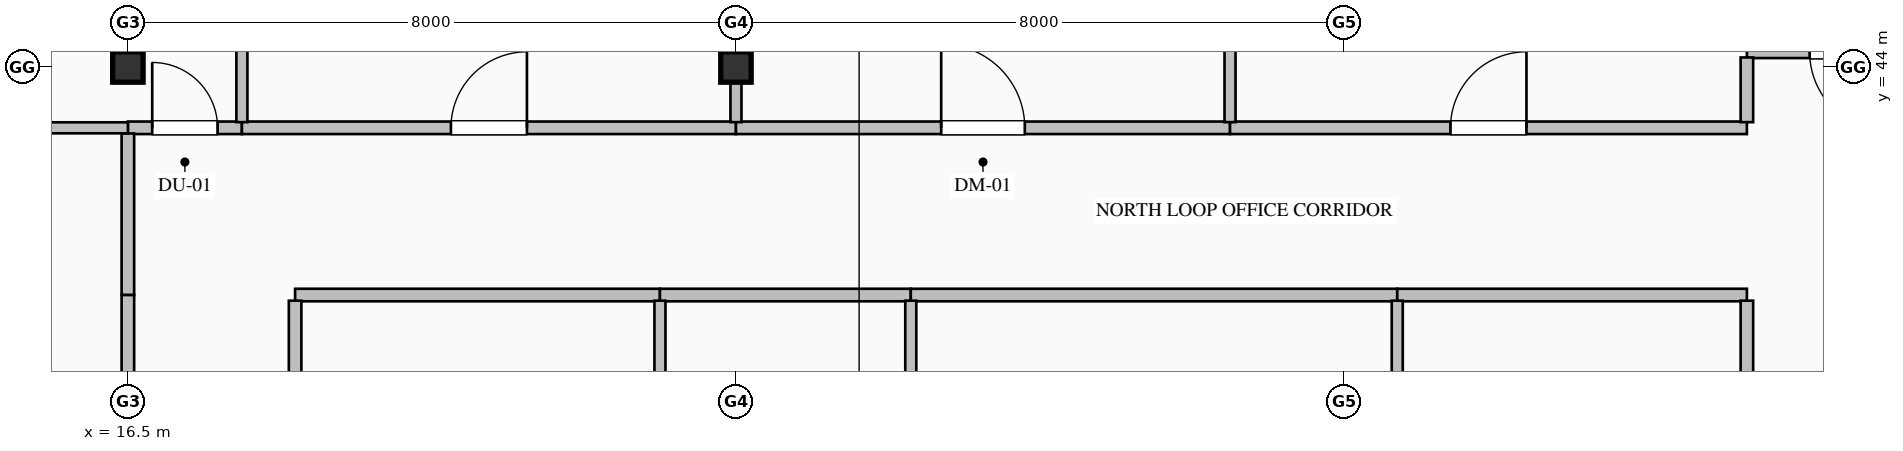
"""IFC4 building model, lengths in metres.
Left out: names, types, materials, properties, quantities, classifications, styles, units other than length and angle.
Written with IfcOpenShell. Run it as: python <this file> out.ifc"""

import sys

from ifc_helpers import new_model, si_unit, direction, frame, frame_2d, origin, origin_2d, place, context, subcontext, project, spatial, rectangle, i_section, extrude, element, fill, save


model = new_model("IFC4")
c1 = context("Model", 3, precision=1e-05, world=origin(), true_north=direction((0.0, 1.0)))
c2 = subcontext(c1, "Body", "Model", "MODEL_VIEW")
j1 = project(units=[si_unit("LENGTHUNIT", "METRE"), si_unit("PLANEANGLEUNIT", "RADIAN")], contexts=[c1])
p1 = place(None, origin())
s1 = spatial("IfcSite", under=j1, at=p1, CompositionType="ELEMENT")
p2 = place(p1, origin())
s2 = spatial("IfcBuilding", under=s1, at=p2, CompositionType="ELEMENT")
p3 = place(p2, frame((0.0, 0.0, 183.0)))
s3 = spatial("IfcBuildingStorey", under=s2, at=p3, CompositionType="ELEMENT", Elevation=183.0)
for number, where, z_axis, x_axis in (
    (1, (16.5, 44.0, 0.0), (0.0, 0.0, 1.0), (1.0, 0.0, 0.0)),
    (2, (24.5, 44.0, 0.0), (0.0, 0.0, 1.0), (1.0, 0.0, 0.0)),
):
    element("IfcColumn", number, at=place(p3, frame(where, z_axis=z_axis, x_axis=x_axis)), inside=s3, PredefinedType="COLUMN", context=c2, shape_type="SweptSolid", body=[
        extrude(i_section(OverallWidth=0.4, OverallDepth=0.4, WebThickness=0.013, FlangeThickness=0.021, FilletRadius=0.022, at=origin_2d()), origin(), (0.0, 0.0, 1.0), 4.0),
    ])
p4 = place(p3, frame((40.5, 44.2, 0.0), z_axis=(0.0, 0.0, 1.0), x_axis=(-1.0, 0.0, 0.0)))
e3 = element("IfcWall", 3, at=p4, inside=s3, PredefinedType="PARTITIONING", context=c2, shape_type="SweptSolid", body=[
    extrude(rectangle(XDim=2.7, YDim=0.165, at=frame_2d((1.35, 0.0))), origin(), (0.0, 0.0, 1.0), 3.765),
])
p5 = place(p4, frame((0.825, 0.0, 0.0)))
e4 = element("IfcOpeningElement", 4, at=p5, cuts=e3, PredefinedType="OPENING", context=c2, shape_type="SweptSolid", body=[
    extrude(rectangle(XDim=1.05, YDim=2.15, at=frame_2d((0.525, 1.075))), frame((0.0, 0.093, 0.0), z_axis=(0.0, -1.0, 0.0), x_axis=(1.0, 0.0, 0.0)), (0.0, 0.0, 1.0), 0.185),
])
p6 = place(p3, frame((16.5, 43.2, 0.0), z_axis=(0.0, 0.0, 1.0), x_axis=(1.0, 0.0, 0.0)))
e5 = element("IfcWall", 5, at=p6, inside=s3, PredefinedType="PARTITIONING", context=c2, shape_type="SweptSolid", body=[
    extrude(rectangle(XDim=1.5, YDim=0.165, at=frame_2d((0.75, 0.0))), origin(), (0.0, 0.0, 1.0), 3.765),
])
p7 = place(p6, frame((0.32, 0.0, 0.0)))
e6 = element("IfcOpeningElement", 6, at=p7, cuts=e5, PredefinedType="OPENING", context=c2, shape_type="SweptSolid", body=[
    extrude(rectangle(XDim=0.86, YDim=2.1, at=frame_2d((0.43, 1.05))), frame((0.0, 0.093, 0.0), z_axis=(0.0, -1.0, 0.0), x_axis=(1.0, 0.0, 0.0)), (0.0, 0.0, 1.0), 0.185),
])
p8 = place(p3, frame((18.0, 43.2, 0.0), z_axis=(0.0, 0.0, 1.0), x_axis=(1.0, 0.0, 0.0)))
e7 = element("IfcWall", 7, at=p8, inside=s3, PredefinedType="PARTITIONING", context=c2, shape_type="SweptSolid", body=[
    extrude(rectangle(XDim=6.5, YDim=0.165, at=frame_2d((3.25, 0.0))), origin(), (0.0, 0.0, 1.0), 3.765),
])
p9 = place(p8, frame((2.75, 0.0, 0.0)))
e8 = element("IfcOpeningElement", 8, at=p9, cuts=e7, PredefinedType="OPENING", context=c2, shape_type="SweptSolid", body=[
    extrude(rectangle(XDim=1.0, YDim=2.15, at=frame_2d((0.5, 1.075))), frame((0.0, 0.093, 0.0), z_axis=(0.0, -1.0, 0.0), x_axis=(1.0, 0.0, 0.0)), (0.0, 0.0, 1.0), 0.185),
])
p10 = place(p3, frame((24.5, 43.2, 0.0), z_axis=(0.0, 0.0, 1.0), x_axis=(1.0, 0.0, 0.0)))
e9 = element("IfcWall", 9, at=p10, inside=s3, PredefinedType="PARTITIONING", context=c2, shape_type="SweptSolid", body=[
    extrude(rectangle(XDim=6.5, YDim=0.165, at=frame_2d((3.25, 0.0))), origin(), (0.0, 0.0, 1.0), 3.765),
])
p11 = place(p10, frame((2.7, 0.0, 0.0)))
e10 = element("IfcOpeningElement", 10, at=p11, cuts=e9, PredefinedType="OPENING", context=c2, shape_type="SweptSolid", body=[
    extrude(rectangle(XDim=1.1, YDim=2.2, at=frame_2d((0.55, 1.1))), frame((0.0, 0.093, 0.0), z_axis=(0.0, -1.0, 0.0), x_axis=(1.0, 0.0, 0.0)), (0.0, 0.0, 1.0), 0.185),
])
p12 = place(p3, frame((31.0, 43.2, 0.0), z_axis=(0.0, 0.0, 1.0), x_axis=(1.0, 0.0, 0.0)))
e11 = element("IfcWall", 11, at=p12, inside=s3, PredefinedType="PARTITIONING", context=c2, shape_type="SweptSolid", body=[
    extrude(rectangle(XDim=6.8, YDim=0.165, at=frame_2d((3.4, 0.0))), origin(), (0.0, 0.0, 1.0), 3.765),
])
p13 = place(p12, frame((2.9, 0.0, 0.0)))
e12 = element("IfcOpeningElement", 12, at=p13, cuts=e11, PredefinedType="OPENING", context=c2, shape_type="SweptSolid", body=[
    extrude(rectangle(XDim=1.0, YDim=2.15, at=frame_2d((0.5, 1.075))), frame((0.0, 0.093, 0.0), z_axis=(0.0, -1.0, 0.0), x_axis=(1.0, 0.0, 0.0)), (0.0, 0.0, 1.0), 0.185),
])
p14 = place(p3, frame((23.5, 41.0, 0.0), z_axis=(0.0, 0.0, 1.0), x_axis=(-1.0, 0.0, 0.0)))
e13 = element("IfcWall", 13, at=p14, inside=s3, PredefinedType="PARTITIONING", context=c2, shape_type="SweptSolid", body=[
    extrude(rectangle(XDim=4.8, YDim=0.165, at=frame_2d((2.4, 0.0))), origin(), (0.0, 0.0, 1.0), 3.765),
])
p15 = place(p3, frame((26.8, 41.0, 0.0), z_axis=(0.0, 0.0, 1.0), x_axis=(-1.0, 0.0, 0.0)))
e14 = element("IfcWall", 14, at=p15, inside=s3, PredefinedType="PARTITIONING", context=c2, shape_type="SweptSolid", body=[
    extrude(rectangle(XDim=3.3, YDim=0.165, at=frame_2d((1.65, 0.0))), origin(), (0.0, 0.0, 1.0), 3.765),
])
p16 = place(p3, frame((33.2, 41.0, 0.0), z_axis=(0.0, 0.0, 1.0), x_axis=(-1.0, 0.0, 0.0)))
e15 = element("IfcWall", 15, at=p16, inside=s3, PredefinedType="PARTITIONING", context=c2, shape_type="SweptSolid", body=[
    extrude(rectangle(XDim=6.4, YDim=0.165, at=frame_2d((3.2, 0.0))), origin(), (0.0, 0.0, 1.0), 3.765),
])
p17 = place(p3, frame((37.8, 41.0, 0.0), z_axis=(0.0, 0.0, 1.0), x_axis=(-1.0, 0.0, 0.0)))
e16 = element("IfcWall", 16, at=p17, inside=s3, PredefinedType="PARTITIONING", context=c2, shape_type="SweptSolid", body=[
    extrude(rectangle(XDim=4.6, YDim=0.165, at=frame_2d((2.3, 0.0))), origin(), (0.0, 0.0, 1.0), 3.765),
])
p18 = place(p3, frame((16.5, 41.0, 0.0), z_axis=(0.0, 0.0, 1.0), x_axis=(0.0, 1.0, 0.0)))
e17 = element("IfcWall", 17, at=p18, inside=s3, PredefinedType="PARTITIONING", context=c2, shape_type="SweptSolid", body=[
    extrude(rectangle(XDim=2.125, YDim=0.165, at=frame_2d((1.063, 0.0))), origin(), (0.0, 0.0, 1.0), 3.157),
])
p19 = place(p3, frame((18.7, 40.926, 0.0), z_axis=(0.0, 0.0, 1.0), x_axis=(0.0, -1.0, 0.0)))
e18 = element("IfcWall", 18, at=p19, inside=s3, PredefinedType="PARTITIONING", context=c2, shape_type="SweptSolid", body=[
    extrude(rectangle(XDim=7.451, YDim=0.165, at=frame_2d((3.726, 0.0))), origin(), (0.0, 0.0, 1.0), 3.765),
])
p20 = place(p19, frame((3.226, 0.0, 0.0)))
e19 = element("IfcOpeningElement", 19, at=p20, cuts=e18, PredefinedType="OPENING", context=c2, shape_type="SweptSolid", body=[
    extrude(rectangle(XDim=1.0, YDim=2.15, at=frame_2d((0.5, 1.075))), frame((0.0, 0.093, 0.0), z_axis=(0.0, -1.0, 0.0), x_axis=(1.0, 0.0, 0.0)), (0.0, 0.0, 1.0), 0.185),
])
p21 = place(p3, frame((16.5, 33.4, 0.0), z_axis=(0.0, 0.0, 1.0), x_axis=(0.0, 1.0, 0.0)))
e20 = element("IfcWall", 20, at=p21, inside=s3, PredefinedType="PARTITIONING", context=c2, shape_type="SweptSolid", body=[
    extrude(rectangle(XDim=7.6, YDim=0.165, at=frame_2d((3.8, 0.0))), origin(), (0.0, 0.0, 1.0), 3.157),
])
p22 = place(p21, frame((3.3, 0.0, 0.0)))
e21 = element("IfcOpeningElement", 21, at=p22, cuts=e20, PredefinedType="OPENING", context=c2, shape_type="SweptSolid", body=[
    extrude(rectangle(XDim=1.0, YDim=2.15, at=frame_2d((0.5, 1.075))), frame((0.0, 0.093, 0.0), z_axis=(0.0, -1.0, 0.0), x_axis=(1.0, 0.0, 0.0)), (0.0, 0.0, 1.0), 0.185),
])
p23 = place(p3, frame((37.8, 43.274, 0.0), z_axis=(0.0, 0.0, 1.0), x_axis=(0.0, 1.0, 0.0)))
e22 = element("IfcWall", 22, at=p23, inside=s3, PredefinedType="PARTITIONING", context=c2, shape_type="SweptSolid", body=[
    extrude(rectangle(XDim=0.851, YDim=0.165, at=frame_2d((0.426, 0.0))), origin(), (0.0, 0.0, 1.0), 3.765),
])
p24 = place(p3, frame((37.8, 33.475, 0.0), z_axis=(0.0, 0.0, 1.0), x_axis=(0.0, 1.0, 0.0)))
e23 = element("IfcWall", 23, at=p24, inside=s3, PredefinedType="PARTITIONING", context=c2, shape_type="SweptSolid", body=[
    extrude(rectangle(XDim=7.451, YDim=0.165, at=frame_2d((3.726, 0.0))), origin(), (0.0, 0.0, 1.0), 3.765),
])
p25 = place(p24, frame((3.226, 0.0, 0.0)))
e24 = element("IfcOpeningElement", 24, at=p25, cuts=e23, PredefinedType="OPENING", context=c2, shape_type="SweptSolid", body=[
    extrude(rectangle(XDim=1.0, YDim=2.15, at=frame_2d((0.5, 1.075))), frame((0.0, 0.093, 0.0), z_axis=(0.0, -1.0, 0.0), x_axis=(1.0, 0.0, 0.0)), (0.0, 0.0, 1.0), 0.185),
])
p26 = place(p3, frame((18.0, 51.648, 0.0), z_axis=(0.0, 0.0, 1.0), x_axis=(0.0, -1.0, 0.0)))
e25 = element("IfcWall", 25, at=p26, inside=s3, PredefinedType="PARTITIONING", context=c2, shape_type="SweptSolid", body=[
    extrude(rectangle(XDim=8.374, YDim=0.145, at=frame_2d((4.187, 0.0))), origin(), (0.0, 0.0, 1.0), 3.765),
])
p27 = place(p3, frame((16.5, 43.2, 0.0), z_axis=(0.0, 0.0, 1.0), x_axis=(-1.0, 0.0, 0.0)))
e26 = element("IfcWall", 26, at=p27, inside=s3, PredefinedType="PARTITIONING", context=c2, shape_type="SweptSolid", body=[
    extrude(rectangle(XDim=5.0, YDim=0.145, at=frame_2d((2.5, 0.0))), origin(), (0.0, 0.0, 1.0), 3.765),
])
p28 = place(p3, frame((24.5, 51.648, 0.0), z_axis=(0.0, 0.0, 1.0), x_axis=(0.0, -1.0, 0.0)))
e27 = element("IfcWall", 27, at=p28, inside=s3, PredefinedType="PARTITIONING", context=c2, shape_type="SweptSolid", body=[
    extrude(rectangle(XDim=8.374, YDim=0.145, at=frame_2d((4.187, 0.0))), origin(), (0.0, 0.0, 1.0), 3.157),
])
p29 = place(p3, frame((31.0, 51.648, 0.0), z_axis=(0.0, 0.0, 1.0), x_axis=(0.0, -1.0, 0.0)))
e28 = element("IfcWall", 28, at=p29, inside=s3, PredefinedType="PARTITIONING", context=c2, shape_type="SweptSolid", body=[
    extrude(rectangle(XDim=8.374, YDim=0.145, at=frame_2d((4.187, 0.0))), origin(), (0.0, 0.0, 1.0), 3.765),
])
for number, where, z_axis, x_axis in (
    (29, (23.5, 40.926, 0.0), (0.0, 0.0, 1.0), (0.0, -1.0, 0.0)),
    (30, (26.8, 40.926, 0.0), (0.0, 0.0, 1.0), (0.0, -1.0, 0.0)),
    (31, (33.2, 40.926, 0.0), (0.0, 0.0, 1.0), (0.0, -1.0, 0.0)),
):
    element("IfcWall", number, at=place(p3, frame(where, z_axis=z_axis, x_axis=x_axis)), inside=s3, PredefinedType="PARTITIONING", context=c2, shape_type="SweptSolid", body=[
        extrude(rectangle(XDim=7.451, YDim=0.145, at=frame_2d((3.726, 0.0))), origin(), (0.0, 0.0, 1.0), 3.765),
    ])
p30 = place(p5, origin())
e32 = element("IfcDoor", 32, at=p30, inside=s3, OperationType="SINGLE_SWING_LEFT", PredefinedType="DOOR", context=c2, shape_type="SweptSolid", body=[
    extrude(rectangle(XDim=1.05, YDim=2.15, at=frame_2d((0.525, 1.075))), frame((0.0, 0.025, 0.0), z_axis=(0.0, -1.0, 0.0), x_axis=(1.0, 0.0, 0.0)), (0.0, 0.0, 1.0), 0.05),
])
fill(e4, e32)
p31 = place(p7, origin())
e33 = element("IfcDoor", 33, at=p31, inside=s3, OperationType="SINGLE_SWING_LEFT", PredefinedType="DOOR", context=c2, shape_type="SweptSolid", body=[
    extrude(rectangle(XDim=0.86, YDim=2.1, at=frame_2d((0.43, 1.05))), frame((0.0, 0.025, 0.0), z_axis=(0.0, -1.0, 0.0), x_axis=(1.0, 0.0, 0.0)), (0.0, 0.0, 1.0), 0.05),
])
fill(e6, e33)
p32 = place(p9, origin())
e34 = element("IfcDoor", 34, at=p32, inside=s3, OperationType="SINGLE_SWING_RIGHT", PredefinedType="DOOR", context=c2, shape_type="SweptSolid", body=[
    extrude(rectangle(XDim=1.0, YDim=2.15, at=frame_2d((0.5, 1.075))), frame((0.0, 0.025, 0.0), z_axis=(0.0, -1.0, 0.0), x_axis=(1.0, 0.0, 0.0)), (0.0, 0.0, 1.0), 0.05),
])
fill(e8, e34)
p33 = place(p11, origin())
e35 = element("IfcDoor", 35, at=p33, inside=s3, OperationType="SINGLE_SWING_LEFT", PredefinedType="DOOR", context=c2, shape_type="SweptSolid", body=[
    extrude(rectangle(XDim=1.1, YDim=2.2, at=frame_2d((0.55, 1.1))), frame((0.0, 0.025, 0.0), z_axis=(0.0, -1.0, 0.0), x_axis=(1.0, 0.0, 0.0)), (0.0, 0.0, 1.0), 0.05),
])
fill(e10, e35)
p34 = place(p13, origin())
e36 = element("IfcDoor", 36, at=p34, inside=s3, OperationType="SINGLE_SWING_RIGHT", PredefinedType="DOOR", context=c2, shape_type="SweptSolid", body=[
    extrude(rectangle(XDim=1.0, YDim=2.15, at=frame_2d((0.5, 1.075))), frame((0.0, 0.025, 0.0), z_axis=(0.0, -1.0, 0.0), x_axis=(1.0, 0.0, 0.0)), (0.0, 0.0, 1.0), 0.05),
])
fill(e12, e36)
save(model, sys.argv[1])
